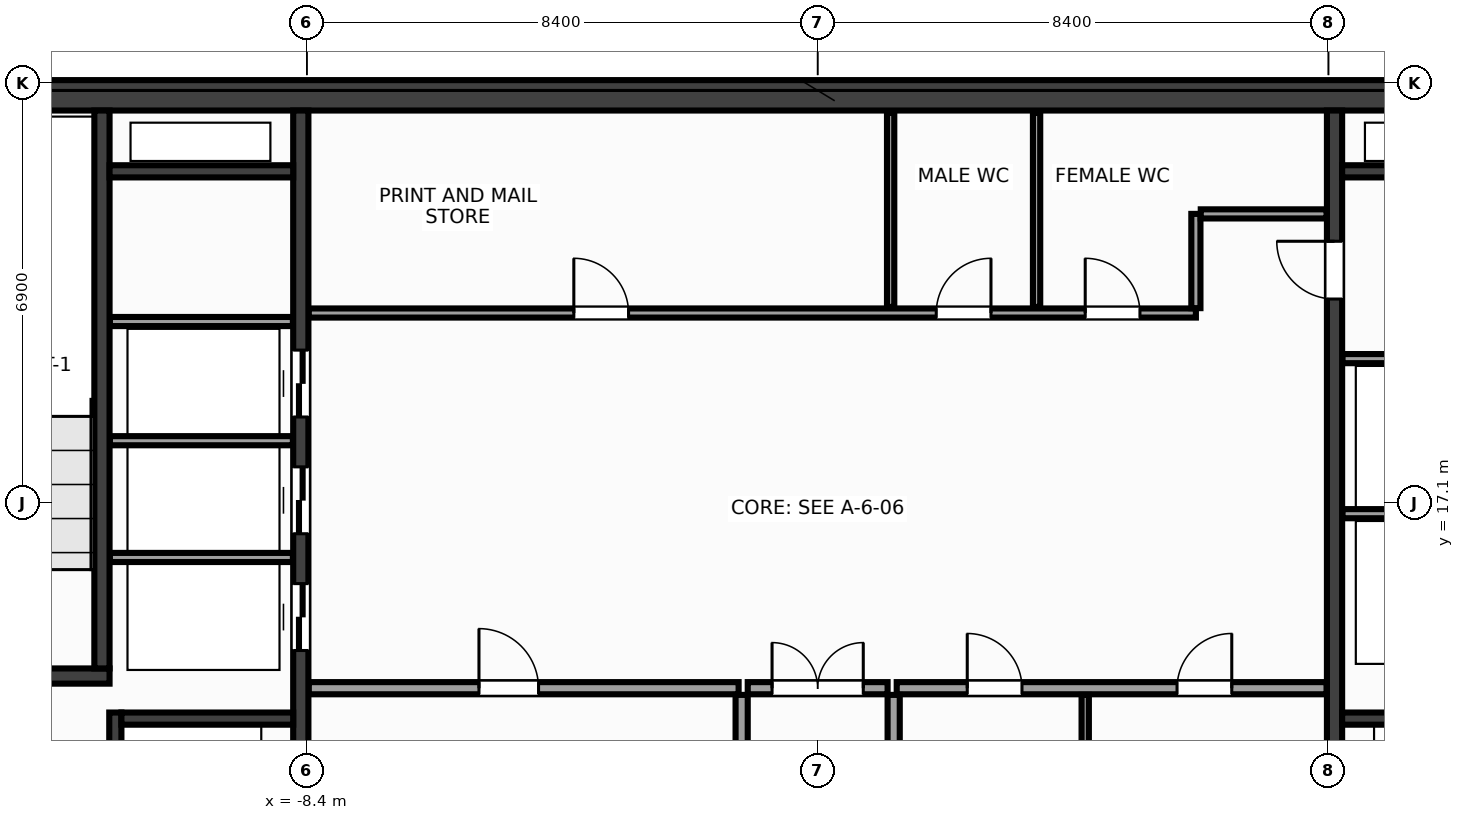
"""IFC4 building model, lengths in metres.
Left out: names, types, materials, properties, quantities, classifications, styles, units other than length and angle.
Written with IfcOpenShell. Run it as: python <this file> out.ifc"""

import sys

from ifc_helpers import new_model, si_unit, direction, frame, frame_2d, origin, place, context, subcontext, project, spatial, rectangle, extrude, source, transform, mapped, element, fill, save


model = new_model("IFC4")
c1 = context("Model", 3, precision=1e-05, world=origin(), true_north=direction((0.0, 1.0)))
c2 = subcontext(c1, "Body", "Model", "MODEL_VIEW")
j1 = project(units=[si_unit("LENGTHUNIT", "METRE"), si_unit("PLANEANGLEUNIT", "RADIAN")], contexts=[c1])
p1 = place(None, origin())
s1 = spatial("IfcSite", under=j1, at=p1, CompositionType="ELEMENT")
p2 = place(p1, origin())
s2 = spatial("IfcBuilding", under=s1, at=p2, CompositionType="ELEMENT")
p3 = place(p2, frame((0.0, 0.0, 218.0)))
s3 = spatial("IfcBuildingStorey", under=s2, at=p3, CompositionType="ELEMENT", Elevation=218.0)
m1 = source(origin(), c2, "Body", "SweptSolid", [
    extrude(rectangle(XDim=31.7, YDim=0.5, at=frame_2d((15.85, 0.0))), origin(), (0.0, 0.0, 1.0), 3.6),
])
p4 = place(p3, frame((-15.85, 23.8, 0.0), z_axis=(0.0, 0.0, 1.0), x_axis=(1.0, 0.0, 0.0)))
e1 = element("IfcWall", 1, at=p4, inside=s3, PredefinedType="SHEAR", context=c2, shape_type="MappedRepresentation", body=[
    mapped(m1, transform((0.0, 0.0, 0.0), x_axis=(1.0, 0.0, 0.0), y_axis=(0.0, 1.0, 0.0), z_axis=(0.0, 0.0, 1.0), scale=1.0)),
])
m2 = source(origin(), c2, "Body", "SweptSolid", [
    extrude(rectangle(XDim=13.1, YDim=0.25, at=frame_2d((6.55, 0.0))), origin(), (0.0, 0.0, 1.0), 3.6),
])
p5 = place(p3, frame((-8.5, 10.45, 0.0), z_axis=(0.0, 0.0, 1.0), x_axis=(0.0, 1.0, 0.0)))
e2 = element("IfcWall", 2, at=p5, inside=s3, PredefinedType="SHEAR", context=c2, shape_type="MappedRepresentation", body=[
    mapped(m2, transform((0.0, 0.0, 0.0), x_axis=(1.0, 0.0, 0.0), y_axis=(0.0, 1.0, 0.0), z_axis=(0.0, 0.0, 1.0), scale=1.0)),
])
p6 = place(p5, frame((4.22, 0.0, 0.0)))
e3 = element("IfcOpeningElement", 3, at=p6, cuts=e2, PredefinedType="OPENING", context=c2, shape_type="SweptSolid", body=[
    extrude(rectangle(XDim=1.1, YDim=2.15, at=frame_2d((0.55, 1.075))), frame((0.0, 0.137, 0.0), z_axis=(0.0, -1.0, 0.0), x_axis=(1.0, 0.0, 0.0)), (0.0, 0.0, 1.0), 0.274),
])
p7 = place(p5, frame((6.14, 0.0, 0.0)))
e4 = element("IfcOpeningElement", 4, at=p7, cuts=e2, PredefinedType="OPENING", context=c2, shape_type="SweptSolid", body=[
    extrude(rectangle(XDim=1.1, YDim=2.15, at=frame_2d((0.55, 1.075))), frame((0.0, 0.137, 0.0), z_axis=(0.0, -1.0, 0.0), x_axis=(1.0, 0.0, 0.0)), (0.0, 0.0, 1.0), 0.274),
])
p8 = place(p5, frame((8.06, 0.0, 0.0)))
e5 = element("IfcOpeningElement", 5, at=p8, cuts=e2, PredefinedType="OPENING", context=c2, shape_type="SweptSolid", body=[
    extrude(rectangle(XDim=1.1, YDim=2.15, at=frame_2d((0.55, 1.075))), frame((0.0, 0.137, 0.0), z_axis=(0.0, -1.0, 0.0), x_axis=(1.0, 0.0, 0.0)), (0.0, 0.0, 1.0), 0.274),
])
p9 = place(p3, frame((8.5, 10.45, 0.0), z_axis=(0.0, 0.0, 1.0), x_axis=(0.0, 1.0, 0.0)))
e6 = element("IfcWall", 6, at=p9, inside=s3, PredefinedType="SHEAR", context=c2, shape_type="MappedRepresentation", body=[
    mapped(m2, transform((0.0, 0.0, 0.0), x_axis=(1.0, 0.0, 0.0), y_axis=(0.0, 1.0, 0.0), z_axis=(0.0, 0.0, 1.0), scale=1.0)),
])
p10 = place(p9, frame((10.0, 0.0, 0.0)))
e7 = element("IfcOpeningElement", 7, at=p10, cuts=e6, PredefinedType="OPENING", context=c2, shape_type="SweptSolid", body=[
    extrude(rectangle(XDim=0.95, YDim=2.15, at=frame_2d((0.475, 1.075))), frame((0.0, 0.137, 0.0), z_axis=(0.0, -1.0, 0.0), x_axis=(1.0, 0.0, 0.0)), (0.0, 0.0, 1.0), 0.274),
])
m3 = source(origin(), c2, "Body", "SweptSolid", [
    extrude(rectangle(XDim=3.705, YDim=0.25, at=frame_2d((1.853, 0.0))), origin(), (0.0, 0.0, 1.0), 3.6),
])
p11 = place(p3, frame((-15.35, 14.25, 0.0), z_axis=(0.0, 0.0, 1.0), x_axis=(1.0, 0.0, 0.0)))
e8 = element("IfcWall", 8, at=p11, inside=s3, PredefinedType="SHEAR", context=c2, shape_type="MappedRepresentation", body=[
    mapped(m3, transform((0.0, 0.0, 0.0), x_axis=(1.0, 0.0, 0.0), y_axis=(0.0, 1.0, 0.0), z_axis=(0.0, 0.0, 1.0), scale=1.0)),
])
p12 = place(p11, frame((0.95, 0.0, 0.0)))
e9 = element("IfcOpeningElement", 9, at=p12, cuts=e8, PredefinedType="OPENING", context=c2, shape_type="SweptSolid", body=[
    extrude(rectangle(XDim=1.6, YDim=2.15, at=frame_2d((0.8, 1.075))), frame((0.0, 0.137, 0.0), z_axis=(0.0, -1.0, 0.0), x_axis=(1.0, 0.0, 0.0)), (0.0, 0.0, 1.0), 0.274),
])
m4 = source(origin(), c2, "Body", "SweptSolid", [
    extrude(rectangle(XDim=9.175, YDim=0.25, at=frame_2d((4.587, 0.0))), origin(), (0.0, 0.0, 1.0), 3.6),
])
p13 = place(p3, frame((-11.77, 14.375, 0.0), z_axis=(0.0, 0.0, 1.0), x_axis=(0.0, 1.0, 0.0)))
e10 = element("IfcWall", 10, at=p13, inside=s3, PredefinedType="SHEAR", context=c2, shape_type="MappedRepresentation", body=[
    mapped(m4, transform((0.0, 0.0, 0.0), x_axis=(1.0, 0.0, 0.0), y_axis=(0.0, 1.0, 0.0), z_axis=(0.0, 0.0, 1.0), scale=1.0)),
])
m5 = source(origin(), c2, "Body", "SweptSolid", [
    extrude(rectangle(XDim=3.2, YDim=0.2, at=frame_2d((1.6, 0.0))), origin(), (0.0, 0.0, 1.0), 3.6),
])
p14 = place(p3, frame((-11.55, 10.45, 0.0), z_axis=(0.0, 0.0, 1.0), x_axis=(0.0, 1.0, 0.0)))
e11 = element("IfcWall", 11, at=p14, inside=s3, PredefinedType="SHEAR", context=c2, shape_type="MappedRepresentation", body=[
    mapped(m5, transform((0.0, 0.0, 0.0), x_axis=(1.0, 0.0, 0.0), y_axis=(0.0, 1.0, 0.0), z_axis=(0.0, 0.0, 1.0), scale=1.0)),
])
p15 = place(p14, frame((0.9, 0.0, 0.0)))
e12 = element("IfcOpeningElement", 12, at=p15, cuts=e11, PredefinedType="OPENING", context=c2, shape_type="SweptSolid", body=[
    extrude(rectangle(XDim=1.1, YDim=2.15, at=frame_2d((0.55, 1.075))), frame((0.0, 0.112, 0.0), z_axis=(0.0, -1.0, 0.0), x_axis=(1.0, 0.0, 0.0)), (0.0, 0.0, 1.0), 0.224),
])
m6 = source(origin(), c2, "Body", "SweptSolid", [
    extrude(rectangle(XDim=2.825, YDim=0.2, at=frame_2d((1.413, 0.0))), origin(), (0.0, 0.0, 1.0), 3.6),
])
for number, where, z_axis, x_axis in (
    (13, (-11.45, 13.55, 0.0), (0.0, 0.0, 1.0), (1.0, 0.0, 0.0)),
    (14, (8.625, 13.55, 0.0), (0.0, 0.0, 1.0), (1.0, 0.0, 0.0)),
):
    element("IfcWall", number, at=place(p3, frame(where, z_axis=z_axis, x_axis=x_axis)), inside=s3, PredefinedType="SHEAR", context=c2, shape_type="MappedRepresentation", body=[
        mapped(m6, transform((0.0, 0.0, 0.0), x_axis=(1.0, 0.0, 0.0), y_axis=(0.0, 1.0, 0.0), z_axis=(0.0, 0.0, 1.0), scale=1.0)),
    ])
m7 = source(origin(), c2, "Body", "SweptSolid", [
    extrude(rectangle(XDim=3.02, YDim=0.2, at=frame_2d((1.51, 0.0))), origin(), (0.0, 0.0, 1.0), 3.6),
])
for number, where, z_axis, x_axis in (
    (15, (-11.645, 22.55, 0.0), (0.0, 0.0, 1.0), (1.0, 0.0, 0.0)),
    (16, (8.625, 22.55, 0.0), (0.0, 0.0, 1.0), (1.0, 0.0, 0.0)),
):
    element("IfcWall", number, at=place(p3, frame(where, z_axis=z_axis, x_axis=x_axis)), inside=s3, PredefinedType="SHEAR", context=c2, shape_type="MappedRepresentation", body=[
        mapped(m7, transform((0.0, 0.0, 0.0), x_axis=(1.0, 0.0, 0.0), y_axis=(0.0, 1.0, 0.0), z_axis=(0.0, 0.0, 1.0), scale=1.0)),
    ])
m8 = source(origin(), c2, "Body", "SweptSolid", [
    extrude(rectangle(XDim=3.01, YDim=0.15, at=frame_2d((1.505, 0.0))), origin(), (0.0, 0.0, 1.0), 3.38),
])
for number, where, z_axis, x_axis in (
    (17, (-11.64, 16.2, 0.0), (0.0, 0.0, 1.0), (1.0, 0.0, 0.0)),
    (18, (-11.64, 18.12, 0.0), (0.0, 0.0, 1.0), (1.0, 0.0, 0.0)),
    (19, (-11.64, 20.08, 0.0), (0.0, 0.0, 1.0), (1.0, 0.0, 0.0)),
    (20, (8.63, 16.92, 0.0), (0.0, 0.0, 1.0), (1.0, 0.0, 0.0)),
    (21, (8.63, 19.47, 0.0), (0.0, 0.0, 1.0), (1.0, 0.0, 0.0)),
):
    element("IfcWall", number, at=place(p3, frame(where, z_axis=z_axis, x_axis=x_axis)), inside=s3, PredefinedType="PARTITIONING", context=c2, shape_type="MappedRepresentation", body=[
        mapped(m8, transform((0.0, 0.0, 0.0), x_axis=(1.0, 0.0, 0.0), y_axis=(0.0, 1.0, 0.0), z_axis=(0.0, 0.0, 1.0), scale=1.0)),
    ])
m9 = source(origin(), c2, "Body", "SweptSolid", [
    extrude(rectangle(XDim=7.07, YDim=0.2, at=frame_2d((3.535, 0.0))), origin(), (0.0, 0.0, 1.0), 3.38),
])
p16 = place(p3, frame((-8.37, 14.05, 0.0), z_axis=(0.0, 0.0, 1.0), x_axis=(1.0, 0.0, 0.0)))
e22 = element("IfcWall", 22, at=p16, inside=s3, PredefinedType="PARTITIONING", context=c2, shape_type="MappedRepresentation", body=[
    mapped(m9, transform((0.0, 0.0, 0.0), x_axis=(1.0, 0.0, 0.0), y_axis=(0.0, 1.0, 0.0), z_axis=(0.0, 0.0, 1.0), scale=1.0)),
])
p17 = place(p16, frame((2.8, 0.0, 0.0)))
e23 = element("IfcOpeningElement", 23, at=p17, cuts=e22, PredefinedType="OPENING", context=c2, shape_type="SweptSolid", body=[
    extrude(rectangle(XDim=0.98, YDim=2.15, at=frame_2d((0.49, 1.075))), frame((0.0, 0.112, 0.0), z_axis=(0.0, -1.0, 0.0), x_axis=(1.0, 0.0, 0.0)), (0.0, 0.0, 1.0), 0.224),
])
p18 = place(p3, frame((1.3, 14.05, 0.0), z_axis=(0.0, 0.0, 1.0), x_axis=(1.0, 0.0, 0.0)))
e24 = element("IfcWall", 24, at=p18, inside=s3, PredefinedType="PARTITIONING", context=c2, shape_type="MappedRepresentation", body=[
    mapped(m9, transform((0.0, 0.0, 0.0), x_axis=(1.0, 0.0, 0.0), y_axis=(0.0, 1.0, 0.0), z_axis=(0.0, 0.0, 1.0), scale=1.0)),
])
p19 = place(p18, frame((1.16, 0.0, 0.0)))
e25 = element("IfcOpeningElement", 25, at=p19, cuts=e24, PredefinedType="OPENING", context=c2, shape_type="SweptSolid", body=[
    extrude(rectangle(XDim=0.9, YDim=2.15, at=frame_2d((0.45, 1.075))), frame((0.0, 0.112, 0.0), z_axis=(0.0, -1.0, 0.0), x_axis=(1.0, 0.0, 0.0)), (0.0, 0.0, 1.0), 0.224),
])
p20 = place(p18, frame((4.61, 0.0, 0.0)))
e26 = element("IfcOpeningElement", 26, at=p20, cuts=e24, PredefinedType="OPENING", context=c2, shape_type="SweptSolid", body=[
    extrude(rectangle(XDim=0.9, YDim=2.15, at=frame_2d((0.45, 1.075))), frame((0.0, 0.112, 0.0), z_axis=(0.0, -1.0, 0.0), x_axis=(1.0, 0.0, 0.0)), (0.0, 0.0, 1.0), 0.224),
])
m10 = source(origin(), c2, "Body", "SweptSolid", [
    extrude(rectangle(XDim=3.49, YDim=0.2, at=frame_2d((1.745, 0.0))), origin(), (0.0, 0.0, 1.0), 3.38),
])
for number, where, z_axis, x_axis in (
    (27, (-1.25, 10.45, 0.0), (0.0, 0.0, 1.0), (0.0, 1.0, 0.0)),
    (28, (1.25, 10.45, 0.0), (0.0, 0.0, 1.0), (0.0, 1.0, 0.0)),
):
    element("IfcWall", number, at=place(p3, frame(where, z_axis=z_axis, x_axis=x_axis)), inside=s3, PredefinedType="PARTITIONING", context=c2, shape_type="MappedRepresentation", body=[
        mapped(m10, transform((0.0, 0.0, 0.0), x_axis=(1.0, 0.0, 0.0), y_axis=(0.0, 1.0, 0.0), z_axis=(0.0, 0.0, 1.0), scale=1.0)),
    ])
m11 = source(origin(), c2, "Body", "SweptSolid", [
    extrude(rectangle(XDim=2.3, YDim=0.2, at=frame_2d((1.15, 0.0))), origin(), (0.0, 0.0, 1.0), 3.38),
])
p21 = place(p3, frame((-1.15, 14.05, 0.0), z_axis=(0.0, 0.0, 1.0), x_axis=(1.0, 0.0, 0.0)))
e29 = element("IfcWall", 29, at=p21, inside=s3, PredefinedType="PARTITIONING", context=c2, shape_type="MappedRepresentation", body=[
    mapped(m11, transform((0.0, 0.0, 0.0), x_axis=(1.0, 0.0, 0.0), y_axis=(0.0, 1.0, 0.0), z_axis=(0.0, 0.0, 1.0), scale=1.0)),
])
p22 = place(p21, frame((0.4, 0.0, 0.0)))
e30 = element("IfcOpeningElement", 30, at=p22, cuts=e29, PredefinedType="OPENING", context=c2, shape_type="SweptSolid", body=[
    extrude(rectangle(XDim=1.5, YDim=2.2, at=frame_2d((0.75, 1.1))), frame((0.0, 0.112, 0.0), z_axis=(0.0, -1.0, 0.0), x_axis=(1.0, 0.0, 0.0)), (0.0, 0.0, 1.0), 0.224),
])
m12 = source(origin(), c2, "Body", "SweptSolid", [
    extrude(rectangle(XDim=14.59, YDim=0.15, at=frame_2d((7.295, 0.0))), origin(), (0.0, 0.0, 1.0), 3.38),
])
p23 = place(p3, frame((-8.37, 20.22, 0.0), z_axis=(0.0, 0.0, 1.0), x_axis=(1.0, 0.0, 0.0)))
e31 = element("IfcWall", 31, at=p23, inside=s3, PredefinedType="PARTITIONING", context=c2, shape_type="MappedRepresentation", body=[
    mapped(m12, transform((0.0, 0.0, 0.0), x_axis=(1.0, 0.0, 0.0), y_axis=(0.0, 1.0, 0.0), z_axis=(0.0, 0.0, 1.0), scale=1.0)),
])
p24 = place(p23, frame((4.36, 0.0, 0.0)))
e32 = element("IfcOpeningElement", 32, at=p24, cuts=e31, PredefinedType="OPENING", context=c2, shape_type="SweptSolid", body=[
    extrude(rectangle(XDim=0.9, YDim=2.15, at=frame_2d((0.45, 1.075))), frame((0.0, 0.087, 0.0), z_axis=(0.0, -1.0, 0.0), x_axis=(1.0, 0.0, 0.0)), (0.0, 0.0, 1.0), 0.174),
])
p25 = place(p23, frame((10.32, 0.0, 0.0)))
e33 = element("IfcOpeningElement", 33, at=p25, cuts=e31, PredefinedType="OPENING", context=c2, shape_type="SweptSolid", body=[
    extrude(rectangle(XDim=0.9, YDim=2.15, at=frame_2d((0.45, 1.075))), frame((0.0, 0.087, 0.0), z_axis=(0.0, -1.0, 0.0), x_axis=(1.0, 0.0, 0.0)), (0.0, 0.0, 1.0), 0.174),
])
p26 = place(p23, frame((12.77, 0.0, 0.0)))
e34 = element("IfcOpeningElement", 34, at=p26, cuts=e31, PredefinedType="OPENING", context=c2, shape_type="SweptSolid", body=[
    extrude(rectangle(XDim=0.9, YDim=2.15, at=frame_2d((0.45, 1.075))), frame((0.0, 0.087, 0.0), z_axis=(0.0, -1.0, 0.0), x_axis=(1.0, 0.0, 0.0)), (0.0, 0.0, 1.0), 0.174),
])
m13 = source(origin(), c2, "Body", "SweptSolid", [
    extrude(rectangle(XDim=1.55, YDim=0.15, at=frame_2d((0.775, 0.0))), origin(), (0.0, 0.0, 1.0), 3.38),
])
p27 = place(p3, frame((6.22, 20.3, 0.0), z_axis=(0.0, 0.0, 1.0), x_axis=(0.0, 1.0, 0.0)))
e35 = element("IfcWall", 35, at=p27, inside=s3, PredefinedType="PARTITIONING", context=c2, shape_type="MappedRepresentation", body=[
    mapped(m13, transform((0.0, 0.0, 0.0), x_axis=(1.0, 0.0, 0.0), y_axis=(0.0, 1.0, 0.0), z_axis=(0.0, 0.0, 1.0), scale=1.0)),
])
m14 = source(origin(), c2, "Body", "SweptSolid", [
    extrude(rectangle(XDim=2.07, YDim=0.15, at=frame_2d((1.035, 0.0))), origin(), (0.0, 0.0, 1.0), 3.38),
])
p28 = place(p3, frame((6.3, 21.85, 0.0), z_axis=(0.0, 0.0, 1.0), x_axis=(1.0, 0.0, 0.0)))
e36 = element("IfcWall", 36, at=p28, inside=s3, PredefinedType="PARTITIONING", context=c2, shape_type="MappedRepresentation", body=[
    mapped(m14, transform((0.0, 0.0, 0.0), x_axis=(1.0, 0.0, 0.0), y_axis=(0.0, 1.0, 0.0), z_axis=(0.0, 0.0, 1.0), scale=1.0)),
])
m15 = source(origin(), c2, "Body", "SweptSolid", [
    extrude(rectangle(XDim=3.49, YDim=0.12, at=frame_2d((1.745, 0.0))), origin(), (0.0, 0.0, 1.0), 3.38),
])
p29 = place(p3, frame((4.4, 10.45, 0.0), z_axis=(0.0, 0.0, 1.0), x_axis=(0.0, 1.0, 0.0)))
e37 = element("IfcWall", 37, at=p29, inside=s3, PredefinedType="PARTITIONING", context=c2, shape_type="MappedRepresentation", body=[
    mapped(m15, transform((0.0, 0.0, 0.0), x_axis=(1.0, 0.0, 0.0), y_axis=(0.0, 1.0, 0.0), z_axis=(0.0, 0.0, 1.0), scale=1.0)),
])
m16 = source(origin(), c2, "Body", "SweptSolid", [
    extrude(rectangle(XDim=3.19, YDim=0.12, at=frame_2d((1.595, 0.0))), origin(), (0.0, 0.0, 1.0), 3.38),
])
for number, where, z_axis, x_axis in (
    (38, (1.2, 20.32, 0.0), (0.0, 0.0, 1.0), (0.0, 1.0, 0.0)),
    (39, (3.6, 20.32, 0.0), (0.0, 0.0, 1.0), (0.0, 1.0, 0.0)),
):
    element("IfcWall", number, at=place(p3, frame(where, z_axis=z_axis, x_axis=x_axis)), inside=s3, PredefinedType="PARTITIONING", context=c2, shape_type="MappedRepresentation", body=[
        mapped(m16, transform((0.0, 0.0, 0.0), x_axis=(1.0, 0.0, 0.0), y_axis=(0.0, 1.0, 0.0), z_axis=(0.0, 0.0, 1.0), scale=1.0)),
    ])
m17 = source(origin(), c2, "Body", "SweptSolid", [
    extrude(rectangle(XDim=1.1, YDim=2.15, at=frame_2d((0.55, 1.075))), frame((0.0, 0.025, 0.0), z_axis=(0.0, -1.0, 0.0), x_axis=(1.0, 0.0, 0.0)), (0.0, 0.0, 1.0), 0.05),
])
p30 = place(p6, origin())
e40 = element("IfcDoor", 40, at=p30, inside=s3, OperationType="DOUBLE_DOOR_SLIDING", PredefinedType="DOOR", context=c2, shape_type="MappedRepresentation", body=[
    mapped(m17, transform((0.0, 0.0, 0.0), x_axis=(1.0, 0.0, 0.0), y_axis=(0.0, 1.0, 0.0), z_axis=(0.0, 0.0, 1.0), scale=1.0)),
])
fill(e3, e40)
p31 = place(p7, origin())
e41 = element("IfcDoor", 41, at=p31, inside=s3, OperationType="DOUBLE_DOOR_SLIDING", PredefinedType="DOOR", context=c2, shape_type="MappedRepresentation", body=[
    mapped(m17, transform((0.0, 0.0, 0.0), x_axis=(1.0, 0.0, 0.0), y_axis=(0.0, 1.0, 0.0), z_axis=(0.0, 0.0, 1.0), scale=1.0)),
])
fill(e4, e41)
p32 = place(p8, origin())
e42 = element("IfcDoor", 42, at=p32, inside=s3, OperationType="DOUBLE_DOOR_SLIDING", PredefinedType="DOOR", context=c2, shape_type="MappedRepresentation", body=[
    mapped(m17, transform((0.0, 0.0, 0.0), x_axis=(1.0, 0.0, 0.0), y_axis=(0.0, 1.0, 0.0), z_axis=(0.0, 0.0, 1.0), scale=1.0)),
])
fill(e5, e42)
m18 = source(origin(), c2, "Body", "SweptSolid", [
    extrude(rectangle(XDim=0.95, YDim=2.15, at=frame_2d((0.475, 1.075))), frame((0.0, 0.025, 0.0), z_axis=(0.0, -1.0, 0.0), x_axis=(1.0, 0.0, 0.0)), (0.0, 0.0, 1.0), 0.05),
])
p33 = place(p10, origin())
e43 = element("IfcDoor", 43, at=p33, inside=s3, OperationType="SINGLE_SWING_RIGHT", PredefinedType="DOOR", context=c2, shape_type="MappedRepresentation", body=[
    mapped(m18, transform((0.0, 0.0, 0.0), x_axis=(1.0, 0.0, 0.0), y_axis=(0.0, 1.0, 0.0), z_axis=(0.0, 0.0, 1.0), scale=1.0)),
])
fill(e7, e43)
m19 = source(origin(), c2, "Body", "SweptSolid", [
    extrude(rectangle(XDim=0.98, YDim=2.15, at=frame_2d((0.49, 1.075))), frame((0.0, 0.025, 0.0), z_axis=(0.0, -1.0, 0.0), x_axis=(1.0, 0.0, 0.0)), (0.0, 0.0, 1.0), 0.05),
])
p34 = place(p17, origin())
e44 = element("IfcDoor", 44, at=p34, inside=s3, OperationType="SINGLE_SWING_LEFT", PredefinedType="DOOR", context=c2, shape_type="MappedRepresentation", body=[
    mapped(m19, transform((0.0, 0.0, 0.0), x_axis=(1.0, 0.0, 0.0), y_axis=(0.0, 1.0, 0.0), z_axis=(0.0, 0.0, 1.0), scale=1.0)),
])
fill(e23, e44)
m20 = source(origin(), c2, "Body", "SweptSolid", [
    extrude(rectangle(XDim=0.9, YDim=2.15, at=frame_2d((0.45, 1.075))), frame((0.0, 0.025, 0.0), z_axis=(0.0, -1.0, 0.0), x_axis=(1.0, 0.0, 0.0)), (0.0, 0.0, 1.0), 0.05),
])
p35 = place(p19, origin())
e45 = element("IfcDoor", 45, at=p35, inside=s3, OperationType="SINGLE_SWING_LEFT", PredefinedType="DOOR", context=c2, shape_type="MappedRepresentation", body=[
    mapped(m20, transform((0.0, 0.0, 0.0), x_axis=(1.0, 0.0, 0.0), y_axis=(0.0, 1.0, 0.0), z_axis=(0.0, 0.0, 1.0), scale=1.0)),
])
fill(e25, e45)
p36 = place(p20, origin())
e46 = element("IfcDoor", 46, at=p36, inside=s3, OperationType="SINGLE_SWING_RIGHT", PredefinedType="DOOR", context=c2, shape_type="MappedRepresentation", body=[
    mapped(m20, transform((0.0, 0.0, 0.0), x_axis=(1.0, 0.0, 0.0), y_axis=(0.0, 1.0, 0.0), z_axis=(0.0, 0.0, 1.0), scale=1.0)),
])
fill(e26, e46)
m21 = source(origin(), c2, "Body", "SweptSolid", [
    extrude(rectangle(XDim=1.5, YDim=2.2, at=frame_2d((0.75, 1.1))), frame((0.0, 0.025, 0.0), z_axis=(0.0, -1.0, 0.0), x_axis=(1.0, 0.0, 0.0)), (0.0, 0.0, 1.0), 0.05),
])
p37 = place(p22, origin())
e47 = element("IfcDoor", 47, at=p37, inside=s3, OperationType="DOUBLE_DOOR_SINGLE_SWING", PredefinedType="DOOR", context=c2, shape_type="MappedRepresentation", body=[
    mapped(m21, transform((0.0, 0.0, 0.0), x_axis=(1.0, 0.0, 0.0), y_axis=(0.0, 1.0, 0.0), z_axis=(0.0, 0.0, 1.0), scale=1.0)),
])
fill(e30, e47)
p38 = place(p24, origin())
e48 = element("IfcDoor", 48, at=p38, inside=s3, OperationType="SINGLE_SWING_LEFT", PredefinedType="DOOR", context=c2, shape_type="MappedRepresentation", body=[
    mapped(m20, transform((0.0, 0.0, 0.0), x_axis=(1.0, 0.0, 0.0), y_axis=(0.0, 1.0, 0.0), z_axis=(0.0, 0.0, 1.0), scale=1.0)),
])
fill(e32, e48)
p39 = place(p25, origin())
e49 = element("IfcDoor", 49, at=p39, inside=s3, OperationType="SINGLE_SWING_RIGHT", PredefinedType="DOOR", context=c2, shape_type="MappedRepresentation", body=[
    mapped(m20, transform((0.0, 0.0, 0.0), x_axis=(1.0, 0.0, 0.0), y_axis=(0.0, 1.0, 0.0), z_axis=(0.0, 0.0, 1.0), scale=1.0)),
])
fill(e33, e49)
p40 = place(p26, origin())
e50 = element("IfcDoor", 50, at=p40, inside=s3, OperationType="SINGLE_SWING_LEFT", PredefinedType="DOOR", context=c2, shape_type="MappedRepresentation", body=[
    mapped(m20, transform((0.0, 0.0, 0.0), x_axis=(1.0, 0.0, 0.0), y_axis=(0.0, 1.0, 0.0), z_axis=(0.0, 0.0, 1.0), scale=1.0)),
])
fill(e34, e50)
save(model, sys.argv[1])
